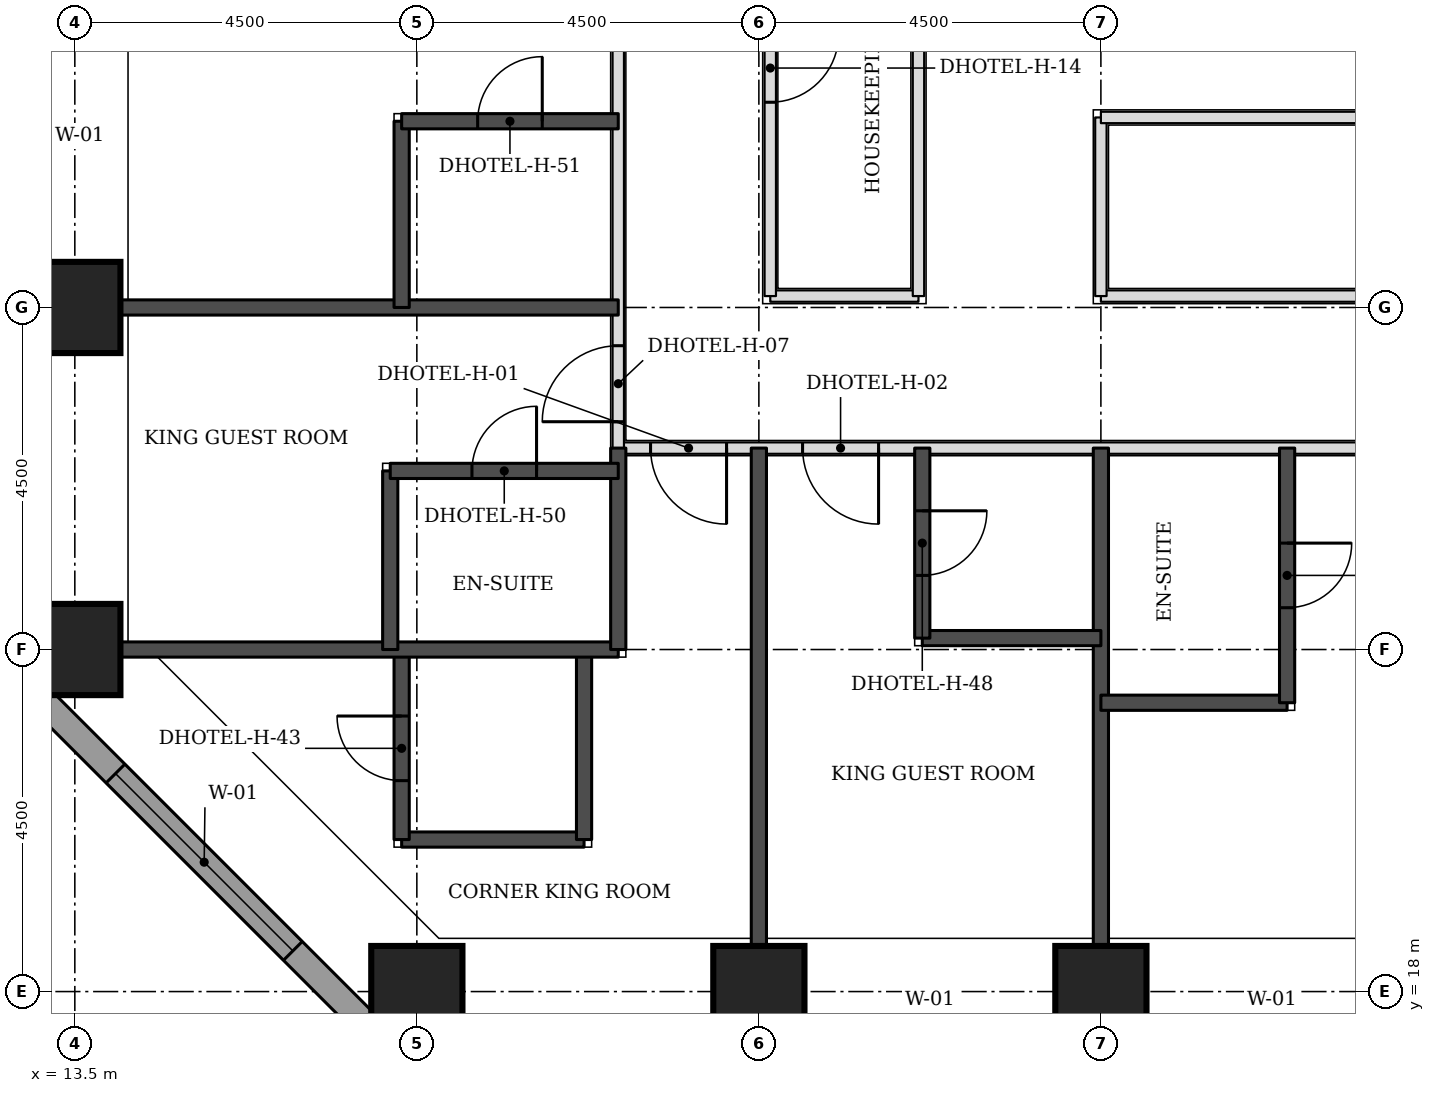
"""IFC4 building model, lengths in metres.
Left out: names, types, materials, properties, quantities, classifications, styles, units other than length and angle.
Written with IfcOpenShell. Run it as: python <this file> out.ifc"""

import sys

from ifc_helpers import new_model, si_unit, direction, frame, frame_2d, origin, origin_2d, place, context, subcontext, project, spatial, rectangle, extrude, element, fill, save


model = new_model("IFC4")
c1 = context("Model", 3, precision=1e-05, world=origin(), true_north=direction((0.0, 1.0)))
c2 = subcontext(c1, "Body", "Model", "MODEL_VIEW")
j1 = project(units=[si_unit("LENGTHUNIT", "METRE"), si_unit("PLANEANGLEUNIT", "RADIAN")], contexts=[c1])
p1 = place(None, origin())
s1 = spatial("IfcSite", under=j1, at=p1, CompositionType="ELEMENT")
p2 = place(p1, origin())
s2 = spatial("IfcBuilding", under=s1, at=p2, CompositionType="ELEMENT")
p3 = place(p2, frame((0.0, 0.0, 46.2)))
s3 = spatial("IfcBuildingStorey", under=s2, at=p3, CompositionType="ELEMENT", Elevation=46.2)
for number, where, z_axis, x_axis in (
    (1, (18.0, 18.0, 0.0), (0.0, 0.0, 1.0), (1.0, 0.0, 0.0)),
    (2, (22.5, 18.0, 0.0), (0.0, 0.0, 1.0), (1.0, 0.0, 0.0)),
    (3, (27.0, 18.0, 0.0), (0.0, 0.0, 1.0), (1.0, 0.0, 0.0)),
    (4, (13.5, 22.5, 0.0), (0.0, 0.0, 1.0), (1.0, 0.0, 0.0)),
    (5, (13.5, 27.0, 0.0), (0.0, 0.0, 1.0), (1.0, 0.0, 0.0)),
):
    element("IfcColumn", number, at=place(p3, frame(where, z_axis=z_axis, x_axis=x_axis)), inside=s3, PredefinedType="COLUMN", context=c2, shape_type="SweptSolid", body=[
        extrude(rectangle(XDim=1.2, YDim=1.2, at=origin_2d()), origin(), (0.0, 0.0, 1.0), 3.3),
    ])
p4 = place(p3, frame((12.674, 22.23, 0.0), z_axis=(0.0, 0.0, 1.0), x_axis=(0.707106781187, -0.707106781187, 0.0)))
e6 = element("IfcWall", 6, at=p4, inside=s3, PredefinedType="STANDARD", context=c2, shape_type="SweptSolid", body=[
    extrude(rectangle(XDim=7.151, YDim=0.35, at=frame_2d((3.576, 0.0))), origin(), (0.0, 0.0, 1.0), 3.055),
])
p5 = place(p4, frame((1.926, 0.0, 0.8)))
e7 = element("IfcOpeningElement", 7, at=p5, cuts=e6, PredefinedType="OPENING", context=c2, shape_type="SweptSolid", body=[
    extrude(rectangle(XDim=3.3, YDim=1.5, at=frame_2d((1.65, 0.75))), frame((0.0, 0.185, 0.0), z_axis=(0.0, -1.0, 0.0), x_axis=(1.0, 0.0, 0.0)), (0.0, 0.0, 1.0), 0.37),
])
p6 = place(p3, frame((20.65, 25.15, 0.0), z_axis=(0.0, 0.0, 1.0), x_axis=(1.0, 0.0, 0.0)))
e8 = element("IfcWall", 8, at=p6, inside=s3, PredefinedType="PARTITIONING", context=c2, shape_type="SweptSolid", body=[
    extrude(rectangle(XDim=30.85, YDim=0.15, at=frame_2d((15.425, 0.0))), origin(), (0.0, 0.0, 1.0), 3.08),
])
p7 = place(p6, frame((2.425, 0.0, 0.0)))
e9 = element("IfcOpeningElement", 9, at=p7, cuts=e8, PredefinedType="OPENING", context=c2, shape_type="SweptSolid", body=[
    extrude(rectangle(XDim=1.0, YDim=2.1, at=frame_2d((0.5, 1.05))), frame((0.0, 0.085, 0.0), z_axis=(0.0, -1.0, 0.0), x_axis=(1.0, 0.0, 0.0)), (0.0, 0.0, 1.0), 0.17),
])
p8 = place(p6, frame((11.575, 0.0, 0.0)))
e10 = element("IfcOpeningElement", 10, at=p8, cuts=e8, PredefinedType="OPENING", context=c2, shape_type="SweptSolid", body=[
    extrude(rectangle(XDim=1.0, YDim=2.1, at=frame_2d((0.5, 1.05))), frame((0.0, 0.085, 0.0), z_axis=(0.0, -1.0, 0.0), x_axis=(1.0, 0.0, 0.0)), (0.0, 0.0, 1.0), 0.17),
])
p9 = place(p6, frame((17.875, 0.0, 0.0)))
e11 = element("IfcOpeningElement", 11, at=p9, cuts=e8, PredefinedType="OPENING", context=c2, shape_type="SweptSolid", body=[
    extrude(rectangle(XDim=1.0, YDim=2.1, at=frame_2d((0.5, 1.05))), frame((0.0, 0.085, 0.0), z_axis=(0.0, -1.0, 0.0), x_axis=(1.0, 0.0, 0.0)), (0.0, 0.0, 1.0), 0.17),
])
p10 = place(p6, frame((27.025, 0.0, 0.0)))
e12 = element("IfcOpeningElement", 12, at=p10, cuts=e8, PredefinedType="OPENING", context=c2, shape_type="SweptSolid", body=[
    extrude(rectangle(XDim=1.0, YDim=2.1, at=frame_2d((0.5, 1.05))), frame((0.0, 0.085, 0.0), z_axis=(0.0, -1.0, 0.0), x_axis=(1.0, 0.0, 0.0)), (0.0, 0.0, 1.0), 0.17),
])
p11 = place(p6, frame((0.425, 0.0, 0.0)))
e13 = element("IfcOpeningElement", 13, at=p11, cuts=e8, PredefinedType="OPENING", context=c2, shape_type="SweptSolid", body=[
    extrude(rectangle(XDim=1.0, YDim=2.1, at=frame_2d((0.5, 1.05))), frame((0.0, 0.085, 0.0), z_axis=(0.0, -1.0, 0.0), x_axis=(1.0, 0.0, 0.0)), (0.0, 0.0, 1.0), 0.17),
])
p12 = place(p6, frame((29.35, 0.0, 0.0)))
e14 = element("IfcOpeningElement", 14, at=p12, cuts=e8, PredefinedType="OPENING", context=c2, shape_type="SweptSolid", body=[
    extrude(rectangle(XDim=1.0, YDim=2.1, at=frame_2d((0.5, 1.05))), frame((0.0, 0.085, 0.0), z_axis=(0.0, -1.0, 0.0), x_axis=(1.0, 0.0, 0.0)), (0.0, 0.0, 1.0), 0.17),
])
p13 = place(p3, frame((20.65, 25.15, 0.0), z_axis=(0.0, 0.0, 1.0), x_axis=(0.0, 1.0, 0.0)))
e15 = element("IfcWall", 15, at=p13, inside=s3, PredefinedType="PARTITIONING", context=c2, shape_type="SweptSolid", body=[
    extrude(rectangle(XDim=24.35, YDim=0.15, at=frame_2d((12.175, 0.0))), origin(), (0.0, 0.0, 1.0), 3.08),
])
p14 = place(p13, frame((0.347, 0.0, 0.0)))
e16 = element("IfcOpeningElement", 16, at=p14, cuts=e15, PredefinedType="OPENING", context=c2, shape_type="SweptSolid", body=[
    extrude(rectangle(XDim=1.0, YDim=2.1, at=frame_2d((0.5, 1.05))), frame((0.0, 0.085, 0.0), z_axis=(0.0, -1.0, 0.0), x_axis=(1.0, 0.0, 0.0)), (0.0, 0.0, 1.0), 0.17),
])
p15 = place(p13, frame((7.075, 0.0, 0.0)))
e17 = element("IfcOpeningElement", 17, at=p15, cuts=e15, PredefinedType="OPENING", context=c2, shape_type="SweptSolid", body=[
    extrude(rectangle(XDim=1.0, YDim=2.1, at=frame_2d((0.5, 1.05))), frame((0.0, 0.085, 0.0), z_axis=(0.0, -1.0, 0.0), x_axis=(1.0, 0.0, 0.0)), (0.0, 0.0, 1.0), 0.17),
])
p16 = place(p13, frame((13.375, 0.0, 0.0)))
e18 = element("IfcOpeningElement", 18, at=p16, cuts=e15, PredefinedType="OPENING", context=c2, shape_type="SweptSolid", body=[
    extrude(rectangle(XDim=1.0, YDim=2.1, at=frame_2d((0.5, 1.05))), frame((0.0, 0.085, 0.0), z_axis=(0.0, -1.0, 0.0), x_axis=(1.0, 0.0, 0.0)), (0.0, 0.0, 1.0), 0.17),
])
p17 = place(p13, frame((21.54, 0.0, 0.0)))
e19 = element("IfcOpeningElement", 19, at=p17, cuts=e15, PredefinedType="OPENING", context=c2, shape_type="SweptSolid", body=[
    extrude(rectangle(XDim=0.9, YDim=2.1, at=frame_2d((0.45, 1.05))), frame((0.0, 0.085, 0.0), z_axis=(0.0, -1.0, 0.0), x_axis=(1.0, 0.0, 0.0)), (0.0, 0.0, 1.0), 0.17),
])
p18 = place(p3, frame((22.65, 27.15, 0.0), z_axis=(0.0, 0.0, 1.0), x_axis=(1.0, 0.0, 0.0)))
e20 = element("IfcWall", 20, at=p18, inside=s3, PredefinedType="PARTITIONING", context=c2, shape_type="SweptSolid", body=[
    extrude(rectangle(XDim=1.95, YDim=0.15, at=frame_2d((0.975, 0.0))), origin(), (0.0, 0.0, 1.0), 3.08),
])
p19 = place(p3, frame((22.65, 27.15, 0.0), z_axis=(0.0, 0.0, 1.0), x_axis=(0.0, 1.0, 0.0)))
e21 = element("IfcWall", 21, at=p19, inside=s3, PredefinedType="PARTITIONING", context=c2, shape_type="SweptSolid", body=[
    extrude(rectangle(XDim=15.85, YDim=0.15, at=frame_2d((7.925, 0.0))), origin(), (0.0, 0.0, 1.0), 3.08),
])
p20 = place(p19, frame((2.55, 0.0, 0.0)))
e22 = element("IfcOpeningElement", 22, at=p20, cuts=e21, PredefinedType="OPENING", context=c2, shape_type="SweptSolid", body=[
    extrude(rectangle(XDim=0.9, YDim=2.1, at=frame_2d((0.45, 1.05))), frame((0.0, 0.085, 0.0), z_axis=(0.0, -1.0, 0.0), x_axis=(1.0, 0.0, 0.0)), (0.0, 0.0, 1.0), 0.17),
])
p21 = place(p19, frame((9.225, 0.0, 0.0)))
e23 = element("IfcOpeningElement", 23, at=p21, cuts=e21, PredefinedType="OPENING", context=c2, shape_type="SweptSolid", body=[
    extrude(rectangle(XDim=0.9, YDim=2.1, at=frame_2d((0.45, 1.05))), frame((0.0, 0.085, 0.0), z_axis=(0.0, -1.0, 0.0), x_axis=(1.0, 0.0, 0.0)), (0.0, 0.0, 1.0), 0.17),
])
p22 = place(p3, frame((24.6, 27.15, 0.0), z_axis=(0.0, 0.0, 1.0), x_axis=(0.0, 1.0, 0.0)))
e24 = element("IfcWall", 24, at=p22, inside=s3, PredefinedType="PARTITIONING", context=c2, shape_type="SweptSolid", body=[
    extrude(rectangle(XDim=13.35, YDim=0.15, at=frame_2d((6.675, 0.0))), origin(), (0.0, 0.0, 1.0), 3.08),
])
p23 = place(p3, frame((27.0, 27.15, 0.0), z_axis=(0.0, 0.0, 1.0), x_axis=(1.0, 0.0, 0.0)))
e25 = element("IfcWall", 25, at=p23, inside=s3, PredefinedType="PARTITIONING", context=c2, shape_type="SweptSolid", body=[
    extrude(rectangle(XDim=11.5, YDim=0.15, at=frame_2d((5.75, 0.0))), origin(), (0.0, 0.0, 1.0), 3.08),
])
p24 = place(p3, frame((27.0, 27.15, 0.0), z_axis=(0.0, 0.0, 1.0), x_axis=(0.0, 1.0, 0.0)))
e26 = element("IfcWall", 26, at=p24, inside=s3, PredefinedType="PARTITIONING", context=c2, shape_type="SweptSolid", body=[
    extrude(rectangle(XDim=2.35, YDim=0.15, at=frame_2d((1.175, 0.0))), origin(), (0.0, 0.0, 1.0), 3.08),
])
p25 = place(p3, frame((27.0, 29.5, 0.0), z_axis=(0.0, 0.0, 1.0), x_axis=(1.0, 0.0, 0.0)))
e27 = element("IfcWall", 27, at=p25, inside=s3, PredefinedType="PARTITIONING", context=c2, shape_type="SweptSolid", body=[
    extrude(rectangle(XDim=9.0, YDim=0.15, at=frame_2d((4.5, 0.0))), origin(), (0.0, 0.0, 1.0), 3.08),
])
p26 = place(p25, frame((4.05, 0.0, 0.0)))
e28 = element("IfcOpeningElement", 28, at=p26, cuts=e27, PredefinedType="OPENING", context=c2, shape_type="SweptSolid", body=[
    extrude(rectangle(XDim=0.9, YDim=2.1, at=frame_2d((0.45, 1.05))), frame((0.0, 0.085, 0.0), z_axis=(0.0, -1.0, 0.0), x_axis=(1.0, 0.0, 0.0)), (0.0, 0.0, 1.0), 0.17),
])
for number, where, z_axis, x_axis in (
    (29, (22.5, 18.6, 0.0), (0.0, 0.0, 1.0), (0.0, 1.0, 0.0)),
    (30, (27.0, 18.6, 0.0), (0.0, 0.0, 1.0), (0.0, 1.0, 0.0)),
):
    element("IfcWall", number, at=place(p3, frame(where, z_axis=z_axis, x_axis=x_axis)), inside=s3, PredefinedType="SOLIDWALL", context=c2, shape_type="SweptSolid", body=[
        extrude(rectangle(XDim=6.55, YDim=0.2, at=frame_2d((3.275, 0.0))), origin(), (0.0, 0.0, 1.0), 3.08),
    ])
p27 = place(p3, frame((17.8, 20.0, 0.0), z_axis=(0.0, 0.0, 1.0), x_axis=(1.0, 0.0, 0.0)))
e31 = element("IfcWall", 31, at=p27, inside=s3, PredefinedType="SOLIDWALL", context=c2, shape_type="SweptSolid", body=[
    extrude(rectangle(XDim=2.4, YDim=0.2, at=frame_2d((1.2, 0.0))), origin(), (0.0, 0.0, 1.0), 3.08),
])
p28 = place(p3, frame((17.8, 20.0, 0.0), z_axis=(0.0, 0.0, 1.0), x_axis=(0.0, 1.0, 0.0)))
e32 = element("IfcWall", 32, at=p28, inside=s3, PredefinedType="SOLIDWALL", context=c2, shape_type="SweptSolid", body=[
    extrude(rectangle(XDim=2.5, YDim=0.2, at=frame_2d((1.25, 0.0))), origin(), (0.0, 0.0, 1.0), 3.08),
])
p29 = place(p28, frame((0.775, 0.0, 0.0)))
e33 = element("IfcOpeningElement", 33, at=p29, cuts=e32, PredefinedType="OPENING", context=c2, shape_type="SweptSolid", body=[
    extrude(rectangle(XDim=0.85, YDim=2.1, at=frame_2d((0.425, 1.05))), frame((0.0, 0.11, 0.0), z_axis=(0.0, -1.0, 0.0), x_axis=(1.0, 0.0, 0.0)), (0.0, 0.0, 1.0), 0.22),
])
p30 = place(p3, frame((20.2, 20.0, 0.0), z_axis=(0.0, 0.0, 1.0), x_axis=(0.0, 1.0, 0.0)))
e34 = element("IfcWall", 34, at=p30, inside=s3, PredefinedType="SOLIDWALL", context=c2, shape_type="SweptSolid", body=[
    extrude(rectangle(XDim=2.5, YDim=0.2, at=frame_2d((1.25, 0.0))), origin(), (0.0, 0.0, 1.0), 3.08),
])
p31 = place(p3, frame((27.0, 21.8, 0.0), z_axis=(0.0, 0.0, 1.0), x_axis=(1.0, 0.0, 0.0)))
e35 = element("IfcWall", 35, at=p31, inside=s3, PredefinedType="SOLIDWALL", context=c2, shape_type="SweptSolid", body=[
    extrude(rectangle(XDim=2.45, YDim=0.2, at=frame_2d((1.225, 0.0))), origin(), (0.0, 0.0, 1.0), 3.08),
])
p32 = place(p3, frame((29.45, 21.8, 0.0), z_axis=(0.0, 0.0, 1.0), x_axis=(0.0, 1.0, 0.0)))
e36 = element("IfcWall", 36, at=p32, inside=s3, PredefinedType="SOLIDWALL", context=c2, shape_type="SweptSolid", body=[
    extrude(rectangle(XDim=3.35, YDim=0.2, at=frame_2d((1.675, 0.0))), origin(), (0.0, 0.0, 1.0), 3.08),
])
p33 = place(p32, frame((1.25, 0.0, 0.0)))
e37 = element("IfcOpeningElement", 37, at=p33, cuts=e36, PredefinedType="OPENING", context=c2, shape_type="SweptSolid", body=[
    extrude(rectangle(XDim=0.85, YDim=2.1, at=frame_2d((0.425, 1.05))), frame((0.0, 0.11, 0.0), z_axis=(0.0, -1.0, 0.0), x_axis=(1.0, 0.0, 0.0)), (0.0, 0.0, 1.0), 0.22),
])
p34 = place(p3, frame((14.1, 22.5, 0.0), z_axis=(0.0, 0.0, 1.0), x_axis=(1.0, 0.0, 0.0)))
e38 = element("IfcWall", 38, at=p34, inside=s3, PredefinedType="SOLIDWALL", context=c2, shape_type="SweptSolid", body=[
    extrude(rectangle(XDim=6.55, YDim=0.2, at=frame_2d((3.275, 0.0))), origin(), (0.0, 0.0, 1.0), 3.08),
])
p35 = place(p3, frame((17.65, 22.5, 0.0), z_axis=(0.0, 0.0, 1.0), x_axis=(0.0, 1.0, 0.0)))
e39 = element("IfcWall", 39, at=p35, inside=s3, PredefinedType="SOLIDWALL", context=c2, shape_type="SweptSolid", body=[
    extrude(rectangle(XDim=2.35, YDim=0.2, at=frame_2d((1.175, 0.0))), origin(), (0.0, 0.0, 1.0), 3.08),
])
p36 = place(p3, frame((20.65, 22.5, 0.0), z_axis=(0.0, 0.0, 1.0), x_axis=(0.0, 1.0, 0.0)))
e40 = element("IfcWall", 40, at=p36, inside=s3, PredefinedType="SOLIDWALL", context=c2, shape_type="SweptSolid", body=[
    extrude(rectangle(XDim=2.65, YDim=0.2, at=frame_2d((1.325, 0.0))), origin(), (0.0, 0.0, 1.0), 3.08),
])
p37 = place(p3, frame((24.65, 22.65, 0.0), z_axis=(0.0, 0.0, 1.0), x_axis=(1.0, 0.0, 0.0)))
e41 = element("IfcWall", 41, at=p37, inside=s3, PredefinedType="SOLIDWALL", context=c2, shape_type="SweptSolid", body=[
    extrude(rectangle(XDim=2.35, YDim=0.2, at=frame_2d((1.175, 0.0))), origin(), (0.0, 0.0, 1.0), 3.08),
])
p38 = place(p3, frame((24.65, 22.65, 0.0), z_axis=(0.0, 0.0, 1.0), x_axis=(0.0, 1.0, 0.0)))
e42 = element("IfcWall", 42, at=p38, inside=s3, PredefinedType="SOLIDWALL", context=c2, shape_type="SweptSolid", body=[
    extrude(rectangle(XDim=2.5, YDim=0.2, at=frame_2d((1.25, 0.0))), origin(), (0.0, 0.0, 1.0), 3.08),
])
p39 = place(p38, frame((0.825, 0.0, 0.0)))
e43 = element("IfcOpeningElement", 43, at=p39, cuts=e42, PredefinedType="OPENING", context=c2, shape_type="SweptSolid", body=[
    extrude(rectangle(XDim=0.85, YDim=2.1, at=frame_2d((0.425, 1.05))), frame((0.0, 0.11, 0.0), z_axis=(0.0, -1.0, 0.0), x_axis=(1.0, 0.0, 0.0)), (0.0, 0.0, 1.0), 0.22),
])
p40 = place(p3, frame((17.65, 24.85, 0.0), z_axis=(0.0, 0.0, 1.0), x_axis=(1.0, 0.0, 0.0)))
e44 = element("IfcWall", 44, at=p40, inside=s3, PredefinedType="SOLIDWALL", context=c2, shape_type="SweptSolid", body=[
    extrude(rectangle(XDim=3.0, YDim=0.2, at=frame_2d((1.5, 0.0))), origin(), (0.0, 0.0, 1.0), 3.08),
])
p41 = place(p40, frame((1.075, 0.0, 0.0)))
e45 = element("IfcOpeningElement", 45, at=p41, cuts=e44, PredefinedType="OPENING", context=c2, shape_type="SweptSolid", body=[
    extrude(rectangle(XDim=0.85, YDim=2.1, at=frame_2d((0.425, 1.05))), frame((0.0, 0.11, 0.0), z_axis=(0.0, -1.0, 0.0), x_axis=(1.0, 0.0, 0.0)), (0.0, 0.0, 1.0), 0.22),
])
p42 = place(p3, frame((14.1, 27.0, 0.0), z_axis=(0.0, 0.0, 1.0), x_axis=(1.0, 0.0, 0.0)))
e46 = element("IfcWall", 46, at=p42, inside=s3, PredefinedType="SOLIDWALL", context=c2, shape_type="SweptSolid", body=[
    extrude(rectangle(XDim=6.55, YDim=0.2, at=frame_2d((3.275, 0.0))), origin(), (0.0, 0.0, 1.0), 3.08),
])
p43 = place(p3, frame((17.8, 27.0, 0.0), z_axis=(0.0, 0.0, 1.0), x_axis=(0.0, 1.0, 0.0)))
e47 = element("IfcWall", 47, at=p43, inside=s3, PredefinedType="SOLIDWALL", context=c2, shape_type="SweptSolid", body=[
    extrude(rectangle(XDim=2.45, YDim=0.2, at=frame_2d((1.225, 0.0))), origin(), (0.0, 0.0, 1.0), 3.08),
])
p44 = place(p3, frame((17.8, 29.45, 0.0), z_axis=(0.0, 0.0, 1.0), x_axis=(1.0, 0.0, 0.0)))
e48 = element("IfcWall", 48, at=p44, inside=s3, PredefinedType="SOLIDWALL", context=c2, shape_type="SweptSolid", body=[
    extrude(rectangle(XDim=2.85, YDim=0.2, at=frame_2d((1.425, 0.0))), origin(), (0.0, 0.0, 1.0), 3.08),
])
p45 = place(p44, frame((1.0, 0.0, 0.0)))
e49 = element("IfcOpeningElement", 49, at=p45, cuts=e48, PredefinedType="OPENING", context=c2, shape_type="SweptSolid", body=[
    extrude(rectangle(XDim=0.85, YDim=2.1, at=frame_2d((0.425, 1.05))), frame((0.0, 0.11, 0.0), z_axis=(0.0, -1.0, 0.0), x_axis=(1.0, 0.0, 0.0)), (0.0, 0.0, 1.0), 0.22),
])
p46 = place(p5, origin())
e50 = element("IfcWindow", 50, at=p46, inside=s3, PartitioningType="SINGLE_PANEL", PredefinedType="WINDOW", context=c2, shape_type="SweptSolid", body=[
    extrude(rectangle(XDim=3.3, YDim=1.5, at=frame_2d((1.65, 0.75))), frame((0.0, 0.085, 0.0), z_axis=(0.0, -1.0, 0.0), x_axis=(1.0, 0.0, 0.0)), (0.0, 0.0, 1.0), 0.06),
])
fill(e7, e50)
p47 = place(p7, frame((1.0, 0.0, 0.0), z_axis=(0.0, 0.0, 1.0), x_axis=(-1.0, 0.0, 0.0)))
e51 = element("IfcDoor", 51, at=p47, inside=s3, OperationType="SINGLE_SWING_LEFT", PredefinedType="DOOR", context=c2, shape_type="SweptSolid", body=[
    extrude(rectangle(XDim=1.0, YDim=2.1, at=frame_2d((0.5, 1.05))), frame((0.0, 0.025, 0.0), z_axis=(0.0, -1.0, 0.0), x_axis=(1.0, 0.0, 0.0)), (0.0, 0.0, 1.0), 0.05),
])
fill(e9, e51)
p48 = place(p39, frame((0.85, 0.0, 0.0), z_axis=(0.0, 0.0, 1.0), x_axis=(-1.0, 0.0, 0.0)))
e52 = element("IfcDoor", 52, at=p48, inside=s3, OperationType="SINGLE_SWING_LEFT", PredefinedType="DOOR", context=c2, shape_type="SweptSolid", body=[
    extrude(rectangle(XDim=0.85, YDim=2.1, at=frame_2d((0.425, 1.05))), frame((0.0, 0.025, 0.0), z_axis=(0.0, -1.0, 0.0), x_axis=(1.0, 0.0, 0.0)), (0.0, 0.0, 1.0), 0.05),
])
fill(e43, e52)
p49 = place(p33, frame((0.85, 0.0, 0.0), z_axis=(0.0, 0.0, 1.0), x_axis=(-1.0, 0.0, 0.0)))
e53 = element("IfcDoor", 53, at=p49, inside=s3, OperationType="SINGLE_SWING_LEFT", PredefinedType="DOOR", context=c2, shape_type="SweptSolid", body=[
    extrude(rectangle(XDim=0.85, YDim=2.1, at=frame_2d((0.425, 1.05))), frame((0.0, 0.025, 0.0), z_axis=(0.0, -1.0, 0.0), x_axis=(1.0, 0.0, 0.0)), (0.0, 0.0, 1.0), 0.05),
])
fill(e37, e53)
p50 = place(p14, origin())
e54 = element("IfcDoor", 54, at=p50, inside=s3, OperationType="SINGLE_SWING_LEFT", PredefinedType="DOOR", context=c2, shape_type="SweptSolid", body=[
    extrude(rectangle(XDim=1.0, YDim=2.1, at=frame_2d((0.5, 1.05))), frame((0.0, 0.025, 0.0), z_axis=(0.0, -1.0, 0.0), x_axis=(1.0, 0.0, 0.0)), (0.0, 0.0, 1.0), 0.05),
])
fill(e16, e54)
p51 = place(p41, origin())
e55 = element("IfcDoor", 55, at=p51, inside=s3, OperationType="SINGLE_SWING_RIGHT", PredefinedType="DOOR", context=c2, shape_type="SweptSolid", body=[
    extrude(rectangle(XDim=0.85, YDim=2.1, at=frame_2d((0.425, 1.05))), frame((0.0, 0.025, 0.0), z_axis=(0.0, -1.0, 0.0), x_axis=(1.0, 0.0, 0.0)), (0.0, 0.0, 1.0), 0.05),
])
fill(e45, e55)
p52 = place(p45, origin())
e56 = element("IfcDoor", 56, at=p52, inside=s3, OperationType="SINGLE_SWING_RIGHT", PredefinedType="DOOR", context=c2, shape_type="SweptSolid", body=[
    extrude(rectangle(XDim=0.85, YDim=2.1, at=frame_2d((0.425, 1.05))), frame((0.0, 0.025, 0.0), z_axis=(0.0, -1.0, 0.0), x_axis=(1.0, 0.0, 0.0)), (0.0, 0.0, 1.0), 0.05),
])
fill(e49, e56)
p53 = place(p11, frame((1.0, 0.0, 0.0), z_axis=(0.0, 0.0, 1.0), x_axis=(-1.0, 0.0, 0.0)))
e57 = element("IfcDoor", 57, at=p53, inside=s3, OperationType="SINGLE_SWING_LEFT", PredefinedType="DOOR", context=c2, shape_type="SweptSolid", body=[
    extrude(rectangle(XDim=1.0, YDim=2.1, at=frame_2d((0.5, 1.05))), frame((0.0, 0.025, 0.0), z_axis=(0.0, -1.0, 0.0), x_axis=(1.0, 0.0, 0.0)), (0.0, 0.0, 1.0), 0.05),
])
fill(e13, e57)
p54 = place(p29, origin())
e58 = element("IfcDoor", 58, at=p54, inside=s3, OperationType="SINGLE_SWING_RIGHT", PredefinedType="DOOR", context=c2, shape_type="SweptSolid", body=[
    extrude(rectangle(XDim=0.85, YDim=2.1, at=frame_2d((0.425, 1.05))), frame((0.0, 0.025, 0.0), z_axis=(0.0, -1.0, 0.0), x_axis=(1.0, 0.0, 0.0)), (0.0, 0.0, 1.0), 0.05),
])
fill(e33, e58)
p55 = place(p20, frame((0.9, 0.0, 0.0), z_axis=(0.0, 0.0, 1.0), x_axis=(-1.0, 0.0, 0.0)))
e59 = element("IfcDoor", 59, at=p55, inside=s3, OperationType="SINGLE_SWING_LEFT", PredefinedType="DOOR", context=c2, shape_type="SweptSolid", body=[
    extrude(rectangle(XDim=0.9, YDim=2.1, at=frame_2d((0.45, 1.05))), frame((0.0, 0.025, 0.0), z_axis=(0.0, -1.0, 0.0), x_axis=(1.0, 0.0, 0.0)), (0.0, 0.0, 1.0), 0.05),
])
fill(e22, e59)
save(model, sys.argv[1])
